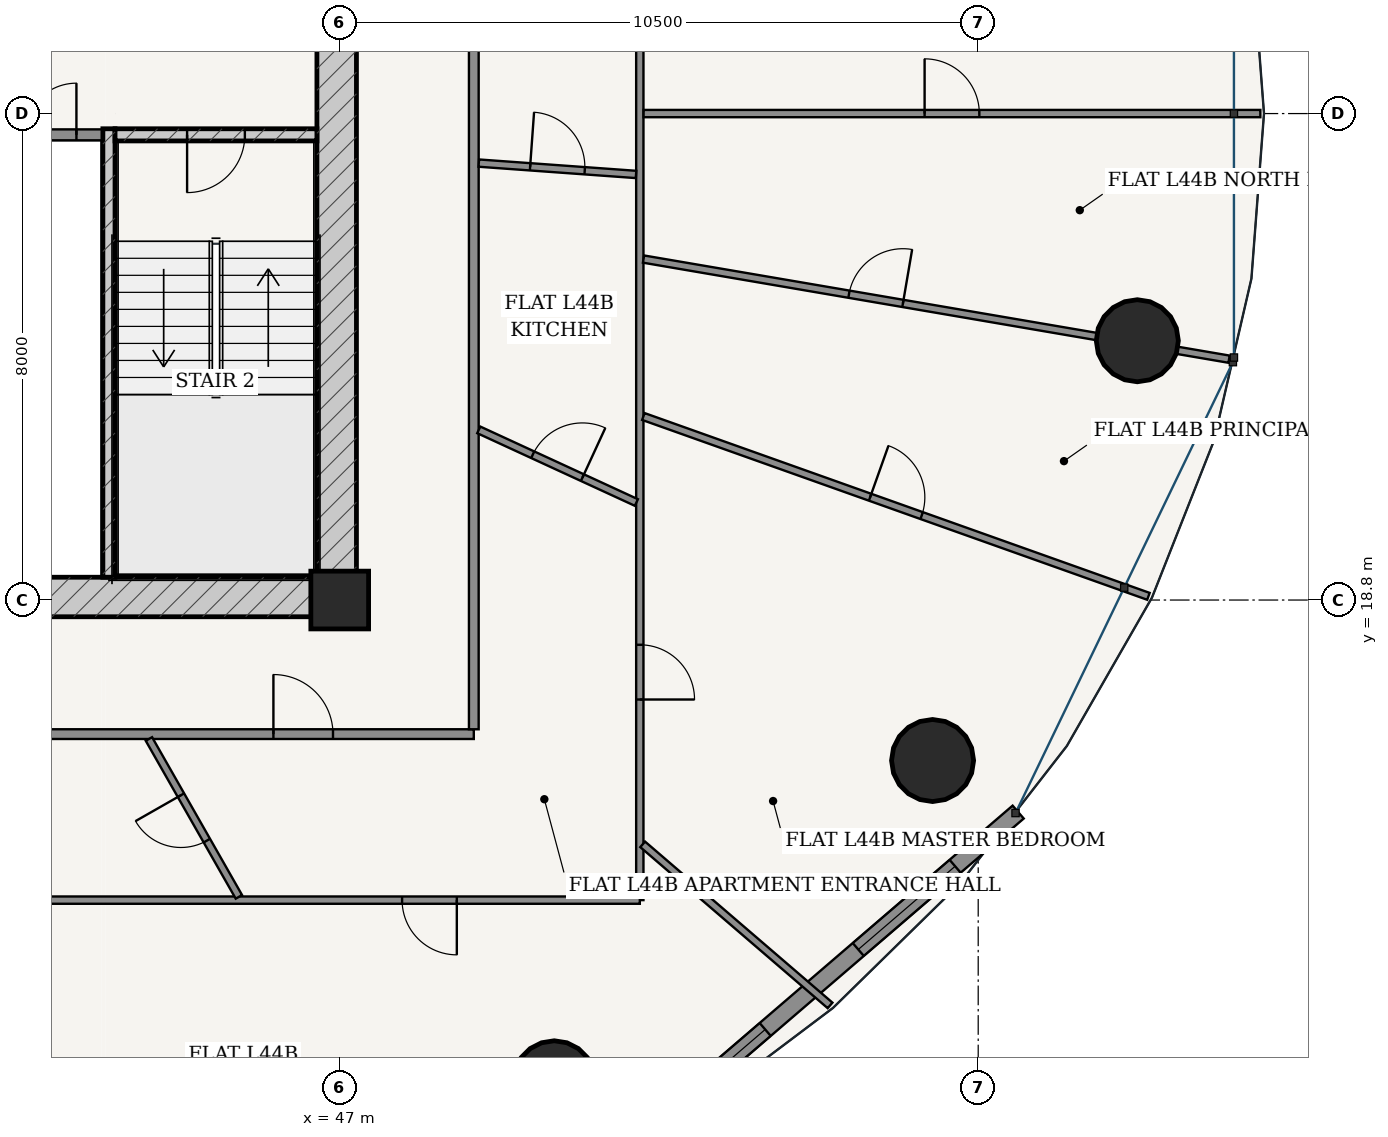
"""IFC4 building model, lengths in metres.
Left out: names, types, materials, properties, quantities, classifications, styles, units other than length and angle.
Written with IfcOpenShell. Run it as: python <this file> out.ifc"""

import sys

from ifc_helpers import new_model, si_unit, direction, frame, frame_2d, origin, origin_2d, place, context, subcontext, project, spatial, rectangle, hollow_circle, extrude, source, transform, mapped, element, fill, save


model = new_model("IFC4")
c1 = context("Model", 3, precision=1e-05, world=origin(), true_north=direction((-0.2419218956, 0.970295726276)))
c2 = subcontext(c1, "Body", "Model", "MODEL_VIEW")
j1 = project(units=[si_unit("LENGTHUNIT", "METRE"), si_unit("PLANEANGLEUNIT", "RADIAN")], contexts=[c1])
p1 = place(None, origin())
s1 = spatial("IfcSite", under=j1, at=p1, CompositionType="ELEMENT")
p2 = place(p1, origin())
s2 = spatial("IfcBuilding", under=s1, at=p2, CompositionType="ELEMENT")
p3 = place(p2, frame((0.0, 0.0, 167.8)))
s3 = spatial("IfcBuildingStorey", under=s2, at=p3, CompositionType="ELEMENT", Elevation=167.8)
p4 = place(p3, frame((47.0, 18.8, 0.0), z_axis=(0.0, 0.0, 1.0), x_axis=(1.0, 0.0, 0.0)))
e1 = element("IfcColumn", 1, at=p4, inside=s3, PredefinedType="COLUMN", context=c2, shape_type="SweptSolid", body=[
    extrude(rectangle(XDim=0.95, YDim=0.95, at=origin_2d()), origin(), (0.0, 0.0, 1.0), 3.6),
])
p5 = place(p3, frame((28.725, 18.85, 0.0), z_axis=(0.0, 0.0, 1.0), x_axis=(1.0, 0.0, 0.0)))
e2 = element("IfcWall", 2, at=p5, inside=s3, PredefinedType="SHEAR", context=c2, shape_type="SweptSolid", body=[
    extrude(rectangle(XDim=18.55, YDim=0.65, at=frame_2d((9.275, 0.0))), origin(), (0.0, 0.0, 1.0), 3.33),
])
p6 = place(p5, frame((6.81, 0.0, 0.0)))
e3 = element("IfcOpeningElement", 3, at=p6, cuts=e2, PredefinedType="OPENING", context=c2, shape_type="SweptSolid", body=[
    extrude(rectangle(XDim=0.85, YDim=2.1, at=frame_2d((0.425, 1.05))), frame((0.0, 0.335, 0.0), z_axis=(0.0, -1.0, 0.0), x_axis=(1.0, 0.0, 0.0)), (0.0, 0.0, 1.0), 0.67),
])
p7 = place(p5, frame((8.85, 0.0, 0.0)))
e4 = element("IfcOpeningElement", 4, at=p7, cuts=e2, PredefinedType="OPENING", context=c2, shape_type="SweptSolid", body=[
    extrude(rectangle(XDim=0.85, YDim=2.1, at=frame_2d((0.425, 1.05))), frame((0.0, 0.335, 0.0), z_axis=(0.0, -1.0, 0.0), x_axis=(1.0, 0.0, 0.0)), (0.0, 0.0, 1.0), 0.67),
])
p8 = place(p5, frame((10.89, 0.0, 0.0)))
e5 = element("IfcOpeningElement", 5, at=p8, cuts=e2, PredefinedType="OPENING", context=c2, shape_type="SweptSolid", body=[
    extrude(rectangle(XDim=0.85, YDim=2.1, at=frame_2d((0.425, 1.05))), frame((0.0, 0.335, 0.0), z_axis=(0.0, -1.0, 0.0), x_axis=(1.0, 0.0, 0.0)), (0.0, 0.0, 1.0), 0.67),
])
p9 = place(p3, frame((46.95, 19.175, 0.0), z_axis=(0.0, 0.0, 1.0), x_axis=(0.0, 1.0, 0.0)))
e6 = element("IfcWall", 6, at=p9, inside=s3, PredefinedType="SHEAR", context=c2, shape_type="SweptSolid", body=[
    extrude(rectangle(XDim=15.25, YDim=0.65, at=frame_2d((7.625, 0.0))), origin(), (0.0, 0.0, 1.0), 3.33),
])
p10 = place(p9, frame((9.875, 0.0, 0.0)))
e7 = element("IfcOpeningElement", 7, at=p10, cuts=e6, PredefinedType="OPENING", context=c2, shape_type="SweptSolid", body=[
    extrude(rectangle(XDim=1.5, YDim=2.2, at=frame_2d((0.75, 1.1))), frame((0.0, 0.335, 0.0), z_axis=(0.0, -1.0, 0.0), x_axis=(1.0, 0.0, 0.0)), (0.0, 0.0, 1.0), 0.67),
])
p11 = place(p3, frame((43.205, 19.175, 0.0), z_axis=(0.0, 0.0, 1.0), x_axis=(0.0, 1.0, 0.0)))
e8 = element("IfcWall", 8, at=p11, inside=s3, PredefinedType="SOLIDWALL", context=c2, shape_type="SweptSolid", body=[
    extrude(rectangle(XDim=7.375, YDim=0.2, at=frame_2d((3.688, 0.0))), origin(), (0.0, 0.0, 1.0), 3.33),
])
p12 = place(p3, frame((43.305, 26.45, 0.0), z_axis=(0.0, 0.0, 1.0), x_axis=(1.0, 0.0, 0.0)))
e9 = element("IfcWall", 9, at=p12, inside=s3, PredefinedType="SOLIDWALL", context=c2, shape_type="SweptSolid", body=[
    extrude(rectangle(XDim=3.32, YDim=0.2, at=frame_2d((1.66, 0.0))), origin(), (0.0, 0.0, 1.0), 3.33),
])
p13 = place(p12, frame((1.185, 0.0, 0.0)))
e10 = element("IfcOpeningElement", 10, at=p13, cuts=e9, PredefinedType="OPENING", context=c2, shape_type="SweptSolid", body=[
    extrude(rectangle(XDim=0.95, YDim=2.15, at=frame_2d((0.475, 1.075))), frame((0.0, 0.11, 0.0), z_axis=(0.0, -1.0, 0.0), x_axis=(1.0, 0.0, 0.0)), (0.0, 0.0, 1.0), 0.22),
])
for number, where, z_axis, x_axis in (
    (11, (50.528, 10.877, 0.0), (0.0, 0.0, 1.0), (1.0, 0.0, 0.0)),
    (12, (56.75, 16.161, 0.0), (0.0, 0.0, 1.0), (1.0, 0.0, 0.0)),
    (13, (60.117, 23.064, 0.0), (0.0, 0.0, 1.0), (1.0, 0.0, 0.0)),
):
    element("IfcColumn", number, at=place(p3, frame(where, z_axis=z_axis, x_axis=x_axis)), inside=s3, PredefinedType="COLUMN", context=c2, shape_type="SweptSolid", body=[
        extrude(hollow_circle(Radius=0.675, WallThickness=0.042, at=origin_2d()), origin(), (0.0, 0.0, 1.0), 3.6),
    ])
p14 = place(p3, frame((51.367, 9.478, 0.0), z_axis=(0.0, 0.0, 1.0), x_axis=(0.75843401647, 0.651749831348, 0.0)))
e14 = element("IfcWall", 14, at=p14, inside=s3, PredefinedType="SOLIDWALL", context=c2, shape_type="SweptSolid", body=[
    extrude(rectangle(XDim=8.952, YDim=0.28, at=frame_2d((4.476, 0.0))), origin(), (0.0, 0.0, 1.0), 3.33),
])
p15 = place(p14, frame((1.367, 0.0, 0.85)))
e15 = element("IfcOpeningElement", 15, at=p15, cuts=e14, PredefinedType="OPENING", context=c2, shape_type="SweptSolid", body=[
    extrude(rectangle(XDim=2.1, YDim=1.95, at=frame_2d((1.05, 0.975))), frame((0.0, 0.15, 0.0), z_axis=(0.0, -1.0, 0.0), x_axis=(1.0, 0.0, 0.0)), (0.0, 0.0, 1.0), 0.3),
])
p16 = place(p14, frame((5.485, 0.0, 0.85)))
e16 = element("IfcOpeningElement", 16, at=p16, cuts=e14, PredefinedType="OPENING", context=c2, shape_type="SweptSolid", body=[
    extrude(rectangle(XDim=2.1, YDim=1.95, at=frame_2d((1.05, 0.975))), frame((0.0, 0.15, 0.0), z_axis=(0.0, -1.0, 0.0), x_axis=(1.0, 0.0, 0.0)), (0.0, 0.0, 1.0), 0.3),
])
p17 = place(p3, frame((41.39, 26.45, 0.0), z_axis=(0.0, 0.0, 1.0), x_axis=(1.0, 0.0, 0.0)))
e17 = element("IfcWall", 17, at=p17, inside=s3, PredefinedType="PARTITIONING", context=c2, shape_type="SweptSolid", body=[
    extrude(rectangle(XDim=1.71, YDim=0.18, at=frame_2d((0.855, 0.0))), origin(), (0.0, 0.0, 1.0), 3.33),
])
p18 = place(p17, frame((0.43, 0.0, 0.0)))
e18 = element("IfcOpeningElement", 18, at=p18, cuts=e17, PredefinedType="OPENING", context=c2, shape_type="SweptSolid", body=[
    extrude(rectangle(XDim=0.85, YDim=2.1, at=frame_2d((0.425, 1.05))), frame((0.0, 0.1, 0.0), z_axis=(0.0, -1.0, 0.0), x_axis=(1.0, 0.0, 0.0)), (0.0, 0.0, 1.0), 0.2),
])
p19 = place(p3, frame((34.32, 16.595, 0.0), z_axis=(0.0, 0.0, 1.0), x_axis=(1.0, 0.0, 0.0)))
e19 = element("IfcWall", 19, at=p19, inside=s3, PredefinedType="PARTITIONING", context=c2, shape_type="SweptSolid", body=[
    extrude(rectangle(XDim=14.885, YDim=0.16, at=frame_2d((7.442, 0.0))), origin(), (0.0, 0.0, 1.0), 2.776),
])
p20 = place(p19, frame((11.59, 0.0, 0.0)))
e20 = element("IfcOpeningElement", 20, at=p20, cuts=e19, PredefinedType="OPENING", context=c2, shape_type="SweptSolid", body=[
    extrude(rectangle(XDim=0.98, YDim=2.2, at=frame_2d((0.49, 1.1))), frame((0.0, 0.09, 0.0), z_axis=(0.0, -1.0, 0.0), x_axis=(1.0, 0.0, 0.0)), (0.0, 0.0, 1.0), 0.18),
])
p21 = place(p3, frame((49.205, 16.675, 0.0), z_axis=(0.0, 0.0, 1.0), x_axis=(0.0, 1.0, 0.0)))
e21 = element("IfcWall", 21, at=p21, inside=s3, PredefinedType="PARTITIONING", context=c2, shape_type="SweptSolid", body=[
    extrude(rectangle(XDim=18.4, YDim=0.16, at=frame_2d((9.2, 0.0))), origin(), (0.0, 0.0, 1.0), 2.776),
])
p22 = place(p3, frame((51.935, 37.885, 0.0), z_axis=(0.0, 0.0, 1.0), x_axis=(0.0, -1.0, 0.0)))
e22 = element("IfcWall", 22, at=p22, inside=s3, PredefinedType="PARTITIONING", context=c2, shape_type="SweptSolid", body=[
    extrude(rectangle(XDim=24.02, YDim=0.12, at=frame_2d((12.01, 0.0))), origin(), (0.0, 0.0, 1.0), 2.776),
])
p23 = place(p22, frame((19.821, 0.0, 0.0)))
e23 = element("IfcOpeningElement", 23, at=p23, cuts=e22, PredefinedType="OPENING", context=c2, shape_type="SweptSolid", body=[
    extrude(rectangle(XDim=0.9, YDim=2.15, at=frame_2d((0.45, 1.075))), frame((0.0, 0.07, 0.0), z_axis=(0.0, -1.0, 0.0), x_axis=(1.0, 0.0, 0.0)), (0.0, 0.0, 1.0), 0.14),
])
p24 = place(p3, frame((51.935, 13.865, 0.0), z_axis=(0.0, 0.0, 1.0), x_axis=(-1.0, 0.0, 0.0)))
e24 = element("IfcWall", 24, at=p24, inside=s3, PredefinedType="PARTITIONING", context=c2, shape_type="SweptSolid", body=[
    extrude(rectangle(XDim=13.833, YDim=0.12, at=frame_2d((6.917, 0.0))), origin(), (0.0, 0.0, 1.0), 2.776),
])
p25 = place(p24, frame((3.009, 0.0, 0.0)))
e25 = element("IfcOpeningElement", 25, at=p25, cuts=e24, PredefinedType="OPENING", context=c2, shape_type="SweptSolid", body=[
    extrude(rectangle(XDim=0.9, YDim=2.15, at=frame_2d((0.45, 1.075))), frame((0.0, 0.07, 0.0), z_axis=(0.0, -1.0, 0.0), x_axis=(1.0, 0.0, 0.0)), (0.0, 0.0, 1.0), 0.14),
])
p26 = place(p3, frame((51.982, 14.782, 0.0), z_axis=(0.0, 0.0, 1.0), x_axis=(0.758356837469, -0.651839632935, 0.0)))
e26 = element("IfcWall", 26, at=p26, inside=s3, PredefinedType="PARTITIONING", context=c2, shape_type="SweptSolid", body=[
    extrude(rectangle(XDim=4.064, YDim=0.12, at=frame_2d((2.032, 0.0))), origin(), (0.0, 0.0, 1.0), 2.846),
])
p27 = place(p3, frame((51.993, 21.818, 0.0), z_axis=(0.0, 0.0, 1.0), x_axis=(0.942077868165, -0.335394231187, 0.0)))
e27 = element("IfcWall", 27, at=p27, inside=s3, PredefinedType="PARTITIONING", context=c2, shape_type="SweptSolid", body=[
    extrude(rectangle(XDim=8.817, YDim=0.12, at=frame_2d((4.408, 0.0))), origin(), (0.0, 0.0, 1.0), 2.846),
])
p28 = place(p27, frame((3.958, 0.0, 0.0)))
e28 = element("IfcOpeningElement", 28, at=p28, cuts=e27, PredefinedType="OPENING", context=c2, shape_type="SweptSolid", body=[
    extrude(rectangle(XDim=0.9, YDim=2.15, at=frame_2d((0.45, 1.075))), frame((0.0, 0.07, 0.0), z_axis=(0.0, -1.0, 0.0), x_axis=(1.0, 0.0, 0.0)), (0.0, 0.0, 1.0), 0.14),
])
p29 = place(p3, frame((51.996, 24.407, 0.0), z_axis=(0.0, 0.0, 1.0), x_axis=(0.985698378271, -0.168519159369, 0.0)))
e29 = element("IfcWall", 29, at=p29, inside=s3, PredefinedType="PARTITIONING", context=c2, shape_type="SweptSolid", body=[
    extrude(rectangle(XDim=9.769, YDim=0.12, at=frame_2d((4.884, 0.0))), origin(), (0.0, 0.0, 1.0), 2.776),
])
p30 = place(p29, frame((3.428, 0.0, 0.0)))
e30 = element("IfcOpeningElement", 30, at=p30, cuts=e29, PredefinedType="OPENING", context=c2, shape_type="SweptSolid", body=[
    extrude(rectangle(XDim=0.9, YDim=2.15, at=frame_2d((0.45, 1.075))), frame((0.0, 0.07, 0.0), z_axis=(0.0, -1.0, 0.0), x_axis=(1.0, 0.0, 0.0)), (0.0, 0.0, 1.0), 0.14),
])
p31 = place(p3, frame((51.997, 26.8, 0.0), z_axis=(0.0, 0.0, 1.0), x_axis=(1.0, 0.0, 0.0)))
e31 = element("IfcWall", 31, at=p31, inside=s3, PredefinedType="PARTITIONING", context=c2, shape_type="SweptSolid", body=[
    extrude(rectangle(XDim=10.143, YDim=0.12, at=frame_2d((5.071, 0.0))), origin(), (0.0, 0.0, 1.0), 2.846),
])
p32 = place(p31, frame((4.622, 0.0, 0.0)))
e32 = element("IfcOpeningElement", 32, at=p32, cuts=e31, PredefinedType="OPENING", context=c2, shape_type="SweptSolid", body=[
    extrude(rectangle(XDim=0.9, YDim=2.15, at=frame_2d((0.45, 1.075))), frame((0.0, 0.07, 0.0), z_axis=(0.0, -1.0, 0.0), x_axis=(1.0, 0.0, 0.0)), (0.0, 0.0, 1.0), 0.14),
])
p33 = place(p3, frame((43.862, 16.515, 0.0), z_axis=(0.0, 0.0, 1.0), x_axis=(0.495214761056, -0.868770591372, 0.0)))
e33 = element("IfcWall", 33, at=p33, inside=s3, PredefinedType="PARTITIONING", context=c2, shape_type="SweptSolid", body=[
    extrude(rectangle(XDim=2.988, YDim=0.12, at=frame_2d((1.494, 0.0))), origin(), (0.0, 0.0, 1.0), 3.005),
])
p34 = place(p33, frame((1.064, 0.0, 0.0)))
e34 = element("IfcOpeningElement", 34, at=p34, cuts=e33, PredefinedType="OPENING", context=c2, shape_type="SweptSolid", body=[
    extrude(rectangle(XDim=0.86, YDim=2.15, at=frame_2d((0.43, 1.075))), frame((0.0, 0.07, 0.0), z_axis=(0.0, -1.0, 0.0), x_axis=(1.0, 0.0, 0.0)), (0.0, 0.0, 1.0), 0.14),
])
p35 = place(p3, frame((49.287, 21.598, 0.0), z_axis=(0.0, 0.0, 1.0), x_axis=(0.908177096136, -0.418586146514, 0.0)))
e35 = element("IfcWall", 35, at=p35, inside=s3, PredefinedType="PARTITIONING", context=c2, shape_type="SweptSolid", body=[
    extrude(rectangle(XDim=2.854, YDim=0.12, at=frame_2d((1.427, 0.0))), origin(), (0.0, 0.0, 1.0), 3.33),
])
p36 = place(p35, frame((0.977, 0.0, 0.0)))
e36 = element("IfcOpeningElement", 36, at=p36, cuts=e35, PredefinedType="OPENING", context=c2, shape_type="SweptSolid", body=[
    extrude(rectangle(XDim=0.9, YDim=2.15, at=frame_2d((0.45, 1.075))), frame((0.0, 0.07, 0.0), z_axis=(0.0, -1.0, 0.0), x_axis=(1.0, 0.0, 0.0)), (0.0, 0.0, 1.0), 0.14),
])
p37 = place(p3, frame((49.287, 25.985, 0.0), z_axis=(0.0, 0.0, 1.0), x_axis=(0.997408744903, -0.07194300237, 0.0)))
e37 = element("IfcWall", 37, at=p37, inside=s3, PredefinedType="PARTITIONING", context=c2, shape_type="SweptSolid", body=[
    extrude(rectangle(XDim=2.593, YDim=0.12, at=frame_2d((1.296, 0.0))), origin(), (0.0, 0.0, 1.0), 3.33),
])
p38 = place(p37, frame((0.846, 0.0, 0.0)))
e38 = element("IfcOpeningElement", 38, at=p38, cuts=e37, PredefinedType="OPENING", context=c2, shape_type="SweptSolid", body=[
    extrude(rectangle(XDim=0.9, YDim=2.15, at=frame_2d((0.45, 1.075))), frame((0.0, 0.07, 0.0), z_axis=(0.0, -1.0, 0.0), x_axis=(1.0, 0.0, 0.0)), (0.0, 0.0, 1.0), 0.14),
])
m1 = source(origin(), c2, "Body", "SweptSolid", [
    extrude(rectangle(XDim=2.1, YDim=1.95, at=frame_2d((1.05, 0.975))), frame((0.0, 0.03, 0.0), z_axis=(0.0, -1.0, 0.0), x_axis=(1.0, 0.0, 0.0)), (0.0, 0.0, 1.0), 0.06),
])
p39 = place(p15, origin())
e39 = element("IfcWindow", 39, at=p39, inside=s3, PartitioningType="SINGLE_PANEL", PredefinedType="WINDOW", context=c2, shape_type="MappedRepresentation", body=[
    mapped(m1, transform((0.0, 0.0, 0.0), scale=1.0)),
])
fill(e15, e39)
p40 = place(p16, origin())
e40 = element("IfcWindow", 40, at=p40, inside=s3, PartitioningType="SINGLE_PANEL", PredefinedType="WINDOW", context=c2, shape_type="MappedRepresentation", body=[
    mapped(m1, transform((0.0, 0.0, 0.0), scale=1.0)),
])
fill(e16, e40)
m2 = source(origin(), c2, "Body", "SweptSolid", [
    extrude(rectangle(XDim=0.95, YDim=2.15, at=frame_2d((0.475, 1.075))), frame((0.0, 0.025, 0.0), z_axis=(0.0, -1.0, 0.0), x_axis=(1.0, 0.0, 0.0)), (0.0, 0.0, 1.0), 0.05),
])
p41 = place(p13, frame((0.95, 0.0, 0.0), z_axis=(0.0, 0.0, 1.0), x_axis=(-1.0, 0.0, 0.0)))
e41 = element("IfcDoor", 41, at=p41, inside=s3, OperationType="SINGLE_SWING_RIGHT", PredefinedType="DOOR", context=c2, shape_type="MappedRepresentation", body=[
    mapped(m2, transform((0.0, 0.0, 0.0), scale=1.0)),
])
fill(e10, e41)
m3 = source(origin(), c2, "Body", "SweptSolid", [
    extrude(rectangle(XDim=0.85, YDim=2.1, at=frame_2d((0.425, 1.05))), frame((0.0, 0.025, 0.0), z_axis=(0.0, -1.0, 0.0), x_axis=(1.0, 0.0, 0.0)), (0.0, 0.0, 1.0), 0.05),
])
p42 = place(p18, origin())
e42 = element("IfcDoor", 42, at=p42, inside=s3, OperationType="SINGLE_SWING_RIGHT", PredefinedType="DOOR", context=c2, shape_type="MappedRepresentation", body=[
    mapped(m3, transform((0.0, 0.0, 0.0), scale=1.0)),
])
fill(e18, e42)
m4 = source(origin(), c2, "Body", "SweptSolid", [
    extrude(rectangle(XDim=0.98, YDim=2.2, at=frame_2d((0.49, 1.1))), frame((0.0, 0.025, 0.0), z_axis=(0.0, -1.0, 0.0), x_axis=(1.0, 0.0, 0.0)), (0.0, 0.0, 1.0), 0.05),
])
p43 = place(p20, origin())
e43 = element("IfcDoor", 43, at=p43, inside=s3, OperationType="SINGLE_SWING_LEFT", PredefinedType="DOOR", context=c2, shape_type="MappedRepresentation", body=[
    mapped(m4, transform((0.0, 0.0, 0.0), scale=1.0)),
])
fill(e20, e43)
m5 = source(origin(), c2, "Body", "SweptSolid", [
    extrude(rectangle(XDim=0.86, YDim=2.15, at=frame_2d((0.43, 1.075))), frame((0.0, 0.025, 0.0), z_axis=(0.0, -1.0, 0.0), x_axis=(1.0, 0.0, 0.0)), (0.0, 0.0, 1.0), 0.05),
])
p44 = place(p34, frame((0.86, 0.0, 0.0), z_axis=(0.0, 0.0, 1.0), x_axis=(-1.0, 0.0, 0.0)))
e44 = element("IfcDoor", 44, at=p44, inside=s3, OperationType="SINGLE_SWING_RIGHT", PredefinedType="DOOR", context=c2, shape_type="MappedRepresentation", body=[
    mapped(m5, transform((0.0, 0.0, 0.0), scale=1.0)),
])
fill(e34, e44)
m6 = source(origin(), c2, "Body", "SweptSolid", [
    extrude(rectangle(XDim=0.9, YDim=2.15, at=frame_2d((0.45, 1.075))), frame((0.0, 0.025, 0.0), z_axis=(0.0, -1.0, 0.0), x_axis=(1.0, 0.0, 0.0)), (0.0, 0.0, 1.0), 0.05),
])
p45 = place(p25, origin())
e45 = element("IfcDoor", 45, at=p45, inside=s3, OperationType="SINGLE_SWING_LEFT", PredefinedType="DOOR", context=c2, shape_type="MappedRepresentation", body=[
    mapped(m6, transform((0.0, 0.0, 0.0), scale=1.0)),
])
fill(e25, e45)
p46 = place(p36, origin())
e46 = element("IfcDoor", 46, at=p46, inside=s3, OperationType="SINGLE_SWING_RIGHT", PredefinedType="DOOR", context=c2, shape_type="MappedRepresentation", body=[
    mapped(m6, transform((0.0, 0.0, 0.0), scale=1.0)),
])
fill(e36, e46)
p47 = place(p38, origin())
e47 = element("IfcDoor", 47, at=p47, inside=s3, OperationType="SINGLE_SWING_LEFT", PredefinedType="DOOR", context=c2, shape_type="MappedRepresentation", body=[
    mapped(m6, transform((0.0, 0.0, 0.0), scale=1.0)),
])
fill(e38, e47)
p48 = place(p23, origin())
e48 = element("IfcDoor", 48, at=p48, inside=s3, OperationType="SINGLE_SWING_RIGHT", PredefinedType="DOOR", context=c2, shape_type="MappedRepresentation", body=[
    mapped(m6, transform((0.0, 0.0, 0.0), scale=1.0)),
])
fill(e23, e48)
p49 = place(p28, origin())
e49 = element("IfcDoor", 49, at=p49, inside=s3, OperationType="SINGLE_SWING_LEFT", PredefinedType="DOOR", context=c2, shape_type="MappedRepresentation", body=[
    mapped(m6, transform((0.0, 0.0, 0.0), scale=1.0)),
])
fill(e28, e49)
p50 = place(p30, origin())
e50 = element("IfcDoor", 50, at=p50, inside=s3, OperationType="SINGLE_SWING_RIGHT", PredefinedType="DOOR", context=c2, shape_type="MappedRepresentation", body=[
    mapped(m6, transform((0.0, 0.0, 0.0), scale=1.0)),
])
fill(e30, e50)
p51 = place(p32, origin())
e51 = element("IfcDoor", 51, at=p51, inside=s3, OperationType="SINGLE_SWING_LEFT", PredefinedType="DOOR", context=c2, shape_type="MappedRepresentation", body=[
    mapped(m6, transform((0.0, 0.0, 0.0), scale=1.0)),
])
fill(e32, e51)
save(model, sys.argv[1])
